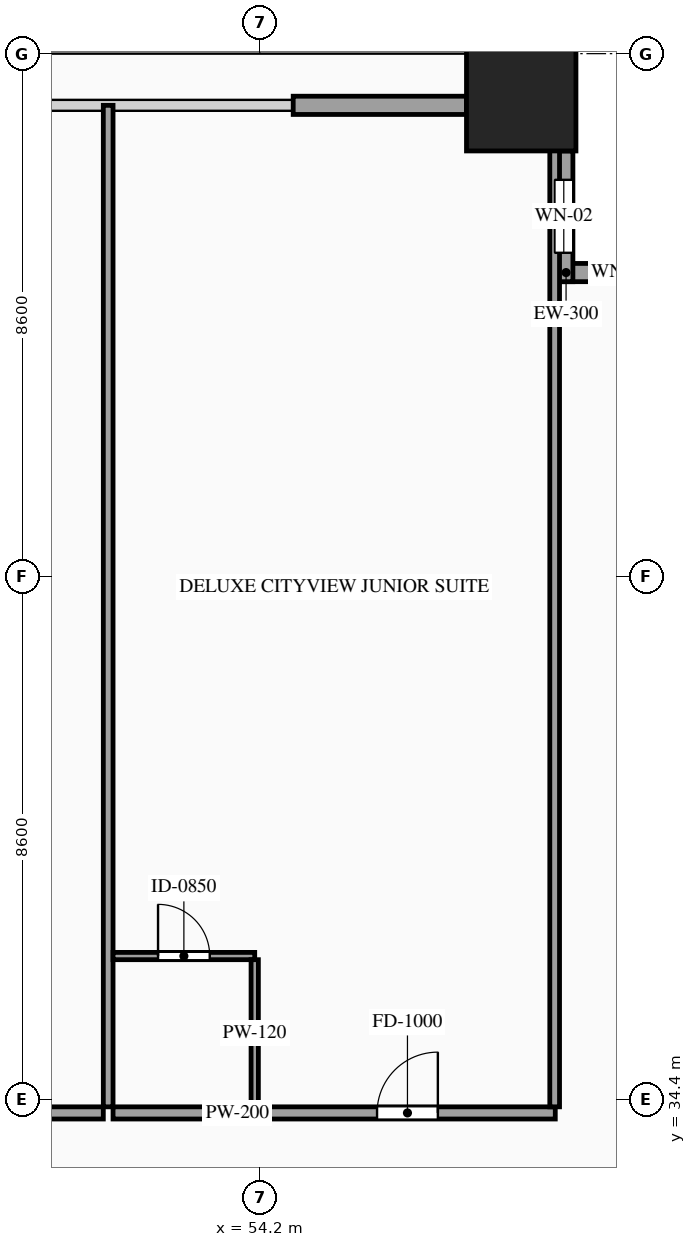
"""IFC4 building model, lengths in metres.
Left out: names, types, materials, properties, quantities, classifications, styles, units other than length and angle.
Written with IfcOpenShell. Run it as: python <this file> out.ifc"""

import sys

from ifc_helpers import new_model, si_unit, direction, frame, frame_2d, origin, origin_2d, place, context, subcontext, project, spatial, rectangle, hollow_rectangle, extrude, source, transform, mapped, element, fill, save


model = new_model("IFC4")
c1 = context("Model", 3, precision=1e-05, world=origin(), true_north=direction((0.0, 1.0)))
c2 = subcontext(c1, "Body", "Model", "MODEL_VIEW")
j1 = project(units=[si_unit("LENGTHUNIT", "METRE"), si_unit("PLANEANGLEUNIT", "RADIAN")], contexts=[c1])
p1 = place(None, origin())
s1 = spatial("IfcSite", under=j1, at=p1, CompositionType="ELEMENT")
p2 = place(p1, origin())
s2 = spatial("IfcBuilding", under=s1, at=p2, CompositionType="ELEMENT")
p3 = place(p2, frame((0.0, 0.0, 37.8)))
s3 = spatial("IfcBuildingStorey", under=s2, at=p3, CompositionType="ELEMENT", Elevation=37.8)
m1 = source(origin(), c2, "Body", "SweptSolid", [
    extrude(hollow_rectangle(XDim=1.8, YDim=1.8, WallThickness=0.08, at=origin_2d()), origin(), (0.0, 0.0, 1.0), 3.6),
])
p4 = place(p3, frame((58.5, 50.9, 0.0), z_axis=(0.0, 0.0, 1.0), x_axis=(1.0, 0.0, 0.0)))
e1 = element("IfcColumn", 1, at=p4, inside=s3, PredefinedType="COLUMN", context=c2, shape_type="MappedRepresentation", body=[
    mapped(m1, transform((0.0, 0.0, 0.0), scale=1.0)),
])
p5 = place(p3, frame((61.2, 48.0, 0.0), z_axis=(0.0, 0.0, 1.0), x_axis=(-1.0, 0.0, 0.0)))
e2 = element("IfcWall", 2, at=p5, inside=s3, PredefinedType="SOLIDWALL", context=c2, shape_type="SweptSolid", body=[
    extrude(rectangle(XDim=2.15, YDim=0.3, at=frame_2d((1.075, 0.0))), origin(), (0.0, 0.0, 1.0), 3.32),
])
p6 = place(p5, frame((0.625, 0.0, 0.85)))
e3 = element("IfcOpeningElement", 3, at=p6, cuts=e2, PredefinedType="OPENING", context=c2, shape_type="SweptSolid", body=[
    extrude(rectangle(XDim=0.9, YDim=1.5, at=frame_2d((0.45, 0.75))), frame((0.0, 0.165, 0.0), z_axis=(0.0, -1.0, 0.0), x_axis=(1.0, 0.0, 0.0)), (0.0, 0.0, 1.0), 0.33),
])
p7 = place(p3, frame((59.2, 47.85, 0.0), z_axis=(0.0, 0.0, 1.0), x_axis=(0.0, 1.0, 0.0)))
e4 = element("IfcWall", 4, at=p7, inside=s3, PredefinedType="SOLIDWALL", context=c2, shape_type="SweptSolid", body=[
    extrude(rectangle(XDim=2.15, YDim=0.3, at=frame_2d((1.075, 0.0))), origin(), (0.0, 0.0, 1.0), 3.32),
])
p8 = place(p7, frame((0.475, 0.0, 0.85)))
e5 = element("IfcOpeningElement", 5, at=p8, cuts=e4, PredefinedType="OPENING", context=c2, shape_type="SweptSolid", body=[
    extrude(rectangle(XDim=1.2, YDim=2.1, at=frame_2d((0.6, 1.05))), frame((0.0, 0.165, 0.0), z_axis=(0.0, -1.0, 0.0), x_axis=(1.0, 0.0, 0.0)), (0.0, 0.0, 1.0), 0.33),
])
m2 = source(origin(), c2, "Body", "SweptSolid", [
    extrude(rectangle(XDim=2.85, YDim=0.3, at=frame_2d((1.425, 0.0))), origin(), (0.0, 0.0, 1.0), 2.715),
])
p9 = place(p3, frame((54.75, 50.75, 0.0), z_axis=(0.0, 0.0, 1.0), x_axis=(1.0, 0.0, 0.0)))
e6 = element("IfcWall", 6, at=p9, inside=s3, PredefinedType="SOLIDWALL", context=c2, shape_type="MappedRepresentation", body=[
    mapped(m2, transform((0.0, 0.0, 0.0), scale=1.0)),
])
p10 = place(p3, frame((44.433, 34.18, 0.0), z_axis=(0.0, 0.0, 1.0), x_axis=(1.0, 0.0, 0.0)))
e7 = element("IfcWall", 7, at=p10, inside=s3, PredefinedType="PARTITIONING", context=c2, shape_type="SweptSolid", body=[
    extrude(rectangle(XDim=7.194, YDim=0.2, at=frame_2d((3.597, 0.0))), origin(), (0.0, 0.0, 1.0), 3.32),
])
p11 = place(p10, frame((4.302, 0.0, 0.0)))
e8 = element("IfcOpeningElement", 8, at=p11, cuts=e7, PredefinedType="OPENING", context=c2, shape_type="SweptSolid", body=[
    extrude(rectangle(XDim=1.0, YDim=2.2, at=frame_2d((0.5, 1.1))), frame((0.0, 0.115, 0.0), z_axis=(0.0, -1.0, 0.0), x_axis=(1.0, 0.0, 0.0)), (0.0, 0.0, 1.0), 0.23),
])
m3 = source(origin(), c2, "Body", "SweptSolid", [
    extrude(rectangle(XDim=16.47, YDim=0.16, at=frame_2d((8.235, 0.0))), origin(), (0.0, 0.0, 1.0), 3.32),
])
p12 = place(p3, frame((51.707, 34.28, 0.0), z_axis=(0.0, 0.0, 1.0), x_axis=(0.0, 1.0, 0.0)))
e9 = element("IfcWall", 9, at=p12, inside=s3, PredefinedType="PARTITIONING", context=c2, shape_type="MappedRepresentation", body=[
    mapped(m3, transform((0.0, 0.0, 0.0), scale=1.0)),
])
p13 = place(p3, frame((51.787, 34.18, 0.0), z_axis=(0.0, 0.0, 1.0), x_axis=(1.0, 0.0, 0.0)))
e10 = element("IfcWall", 10, at=p13, inside=s3, PredefinedType="PARTITIONING", context=c2, shape_type="SweptSolid", body=[
    extrude(rectangle(XDim=7.273, YDim=0.2, at=frame_2d((3.636, 0.0))), origin(), (0.0, 0.0, 1.0), 3.32),
])
p14 = place(p13, frame((4.342, 0.0, 0.0)))
e11 = element("IfcOpeningElement", 11, at=p14, cuts=e10, PredefinedType="OPENING", context=c2, shape_type="SweptSolid", body=[
    extrude(rectangle(XDim=1.0, YDim=2.2, at=frame_2d((0.5, 1.1))), frame((0.0, 0.115, 0.0), z_axis=(0.0, -1.0, 0.0), x_axis=(1.0, 0.0, 0.0)), (0.0, 0.0, 1.0), 0.23),
])
m4 = source(origin(), c2, "Body", "SweptSolid", [
    extrude(rectangle(XDim=16.32, YDim=0.16, at=frame_2d((8.16, 0.0))), origin(), (0.0, 0.0, 1.0), 3.32),
])
p15 = place(p3, frame((59.05, 34.28, 0.0), z_axis=(0.0, 0.0, 1.0), x_axis=(0.0, 1.0, 0.0)))
e12 = element("IfcWall", 12, at=p15, inside=s3, PredefinedType="PARTITIONING", context=c2, shape_type="MappedRepresentation", body=[
    mapped(m4, transform((0.0, 0.0, 0.0), scale=1.0)),
])
p16 = place(p3, frame((51.787, 36.76, 0.0), z_axis=(0.0, 0.0, 1.0), x_axis=(1.0, 0.0, 0.0)))
e13 = element("IfcWall", 13, at=p16, inside=s3, PredefinedType="PARTITIONING", context=c2, shape_type="SweptSolid", body=[
    extrude(rectangle(XDim=2.33, YDim=0.12, at=frame_2d((1.165, 0.0))), origin(), (0.0, 0.0, 1.0), 3.32),
])
p17 = place(p16, frame((0.74, 0.0, 0.0)))
e14 = element("IfcOpeningElement", 14, at=p17, cuts=e13, PredefinedType="OPENING", context=c2, shape_type="SweptSolid", body=[
    extrude(rectangle(XDim=0.85, YDim=2.1, at=frame_2d((0.425, 1.05))), frame((0.0, 0.075, 0.0), z_axis=(0.0, -1.0, 0.0), x_axis=(1.0, 0.0, 0.0)), (0.0, 0.0, 1.0), 0.15),
])
m5 = source(origin(), c2, "Body", "SweptSolid", [
    extrude(rectangle(XDim=2.42, YDim=0.12, at=frame_2d((1.21, 0.0))), origin(), (0.0, 0.0, 1.0), 3.32),
])
p18 = place(p3, frame((54.117, 34.28, 0.0), z_axis=(0.0, 0.0, 1.0), x_axis=(0.0, 1.0, 0.0)))
e15 = element("IfcWall", 15, at=p18, inside=s3, PredefinedType="PARTITIONING", context=c2, shape_type="MappedRepresentation", body=[
    mapped(m5, transform((0.0, 0.0, 0.0), scale=1.0)),
])
m6 = source(origin(), c2, "Body", "SweptSolid", [
    extrude(rectangle(XDim=0.9, YDim=1.5, at=frame_2d((0.45, 0.75))), frame((0.0, 0.03, 0.0), z_axis=(0.0, -1.0, 0.0), x_axis=(1.0, 0.0, 0.0)), (0.0, 0.0, 1.0), 0.06),
])
p19 = place(p6, origin())
e16 = element("IfcWindow", 16, at=p19, inside=s3, PartitioningType="SINGLE_PANEL", PredefinedType="WINDOW", context=c2, shape_type="MappedRepresentation", body=[
    mapped(m6, transform((0.0, 0.0, 0.0), scale=1.0)),
])
fill(e3, e16)
m7 = source(origin(), c2, "Body", "SweptSolid", [
    extrude(rectangle(XDim=1.2, YDim=2.1, at=frame_2d((0.6, 1.05))), frame((0.0, 0.03, 0.0), z_axis=(0.0, -1.0, 0.0), x_axis=(1.0, 0.0, 0.0)), (0.0, 0.0, 1.0), 0.06),
])
p20 = place(p8, origin())
e17 = element("IfcWindow", 17, at=p20, inside=s3, PartitioningType="SINGLE_PANEL", PredefinedType="WINDOW", context=c2, shape_type="MappedRepresentation", body=[
    mapped(m7, transform((0.0, 0.0, 0.0), scale=1.0)),
])
fill(e5, e17)
m8 = source(origin(), c2, "Body", "SweptSolid", [
    extrude(rectangle(XDim=1.0, YDim=2.2, at=frame_2d((0.5, 1.1))), frame((0.0, 0.025, 0.0), z_axis=(0.0, -1.0, 0.0), x_axis=(1.0, 0.0, 0.0)), (0.0, 0.0, 1.0), 0.05),
])
p21 = place(p14, origin())
e18 = element("IfcDoor", 18, at=p21, inside=s3, OperationType="SINGLE_SWING_RIGHT", PredefinedType="DOOR", context=c2, shape_type="MappedRepresentation", body=[
    mapped(m8, transform((0.0, 0.0, 0.0), scale=1.0)),
])
fill(e11, e18)
m9 = source(origin(), c2, "Body", "SweptSolid", [
    extrude(rectangle(XDim=0.85, YDim=2.1, at=frame_2d((0.425, 1.05))), frame((0.0, 0.025, 0.0), z_axis=(0.0, -1.0, 0.0), x_axis=(1.0, 0.0, 0.0)), (0.0, 0.0, 1.0), 0.05),
])
p22 = place(p17, origin())
e19 = element("IfcDoor", 19, at=p22, inside=s3, OperationType="SINGLE_SWING_LEFT", PredefinedType="DOOR", context=c2, shape_type="MappedRepresentation", body=[
    mapped(m9, transform((0.0, 0.0, 0.0), scale=1.0)),
])
fill(e14, e19)
save(model, sys.argv[1])
